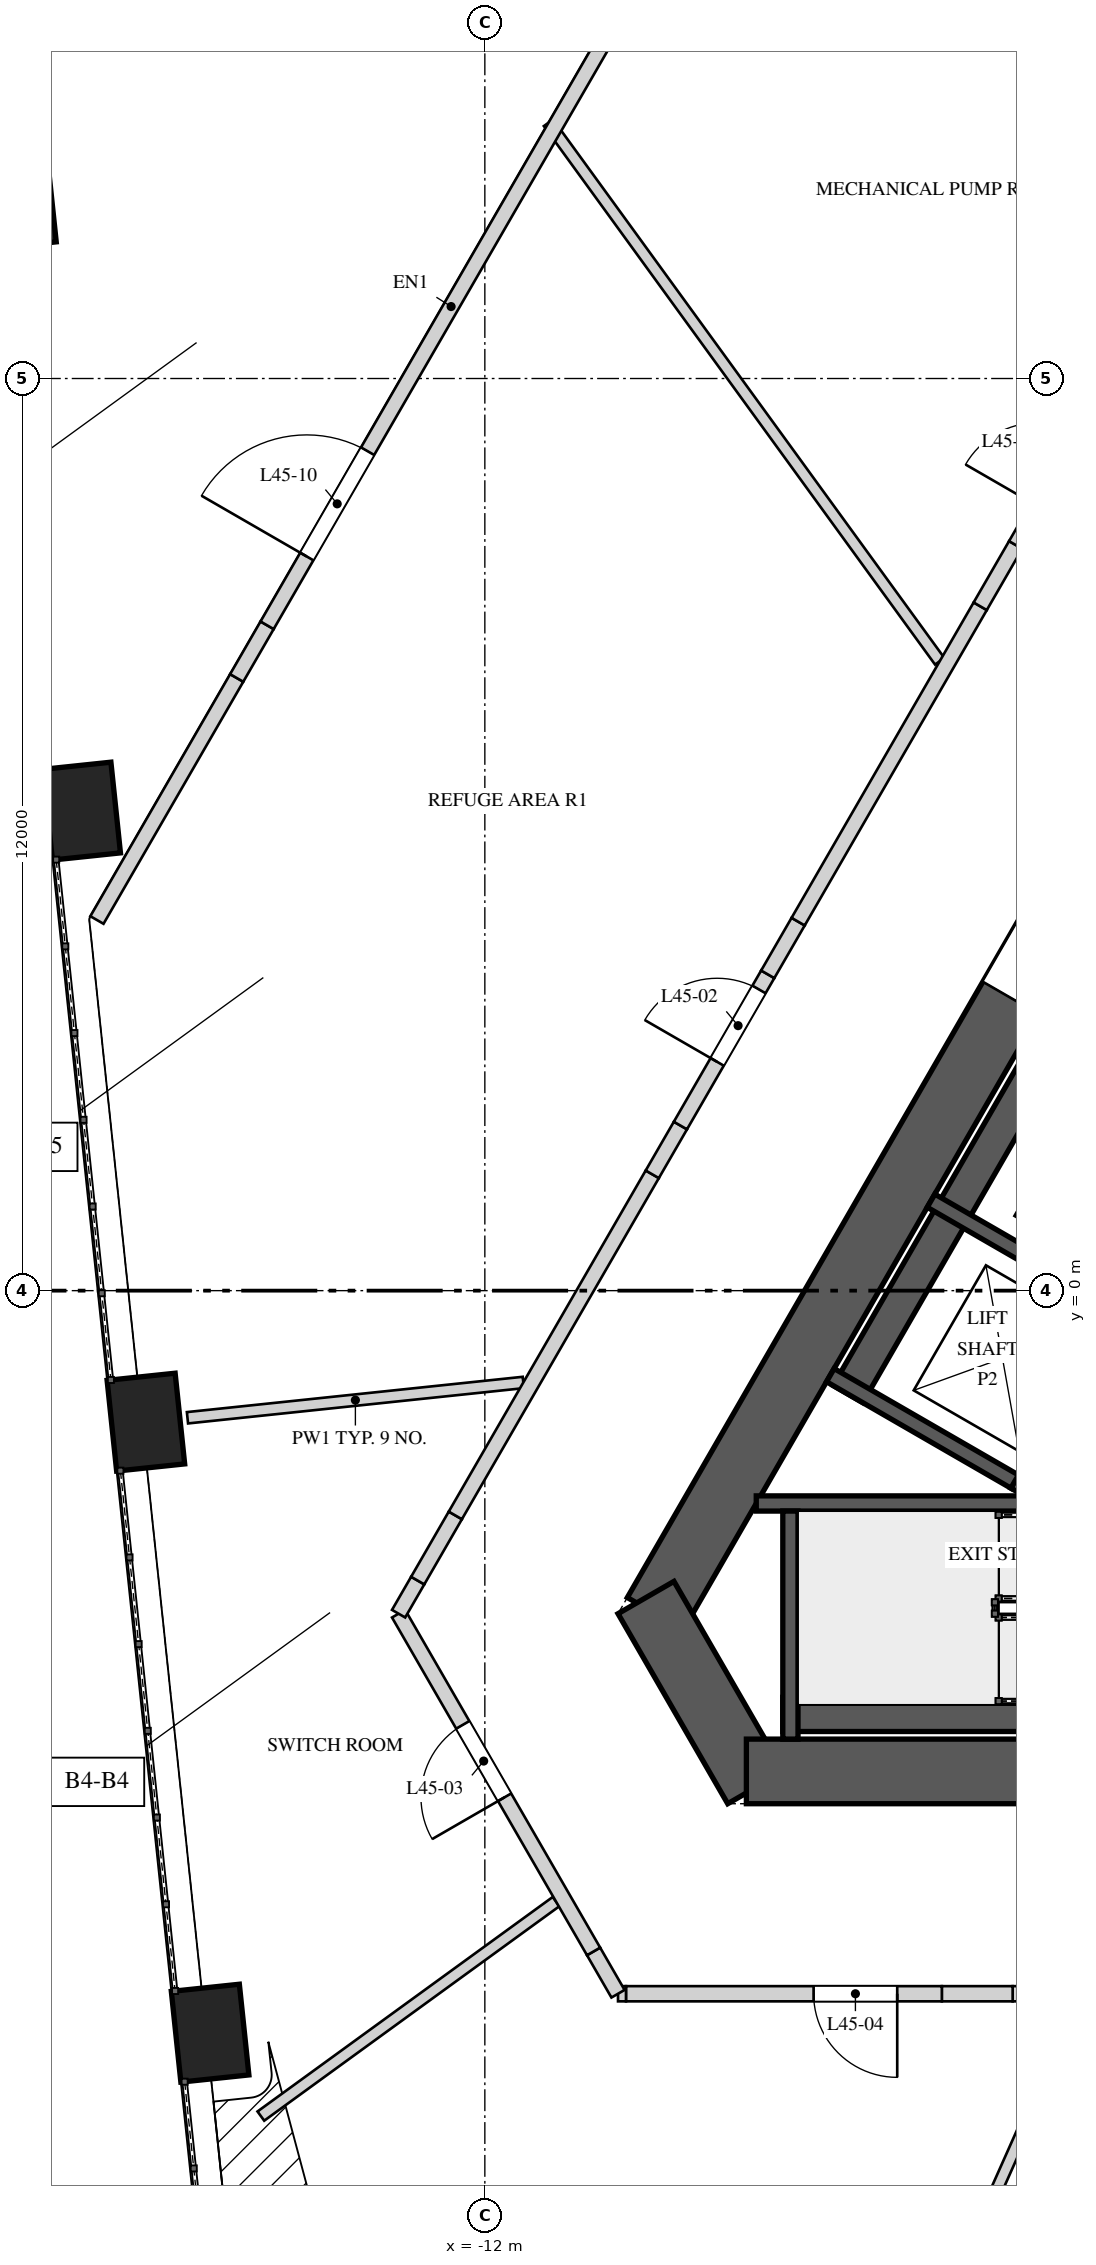
"""IFC4 building model, lengths in metres.
Left out: names, types, materials, properties, quantities, classifications, styles, units other than length and angle.
Written with IfcOpenShell. Run it as: python <this file> out.ifc"""

import sys

from ifc_helpers import new_model, si_unit, direction, frame, frame_2d, origin, origin_2d, place, context, subcontext, project, spatial, rectangle, extrude, element, fill, save


model = new_model("IFC4")
c1 = context("Model", 3, precision=1e-05, world=origin(), true_north=direction((0.0, 1.0)))
c2 = subcontext(c1, "Body", "Model", "MODEL_VIEW")
j1 = project(units=[si_unit("LENGTHUNIT", "METRE"), si_unit("PLANEANGLEUNIT", "RADIAN")], contexts=[c1])
p1 = place(None, origin())
s1 = spatial("IfcSite", under=j1, at=p1, CompositionType="ELEMENT")
p2 = place(p1, origin())
s2 = spatial("IfcBuilding", under=s1, at=p2, CompositionType="ELEMENT")
p3 = place(p2, frame((0.0, 0.0, 194.8)))
s3 = spatial("IfcBuildingStorey", under=s2, at=p3, CompositionType="ELEMENT", Elevation=194.8)
p4 = place(p3, frame((-1.198, 10.575, 0.0), z_axis=(0.0, 0.0, 1.0), x_axis=(-0.499995289315, -0.866028123483, 0.0)))
e1 = element("IfcWall", 1, at=p4, inside=s3, PredefinedType="SHEAR", context=c2, shape_type="SweptSolid", body=[
    extrude(rectangle(XDim=17.118, YDim=0.85, at=frame_2d((8.559, 0.0))), origin(), (0.0, 0.0, 1.0), 5.2),
])
p5 = place(p4, frame((6.764, 0.0, 0.0)))
e2 = element("IfcOpeningElement", 2, at=p5, cuts=e1, PredefinedType="OPENING", context=c2, shape_type="SweptSolid", body=[
    extrude(rectangle(XDim=1.0, YDim=2.4, at=frame_2d((0.5, 1.2))), frame((0.0, 0.435, 0.0), z_axis=(0.0, -1.0, 0.0), x_axis=(1.0, 0.0, 0.0)), (0.0, 0.0, 1.0), 0.87),
])
p6 = place(p3, frame((-9.88, -4.038, 0.0), z_axis=(0.0, 0.0, 1.0), x_axis=(0.499995765644, -0.866027848477, 0.0)))
e3 = element("IfcWall", 3, at=p6, inside=s3, PredefinedType="SHEAR", context=c2, shape_type="SweptSolid", body=[
    extrude(rectangle(XDim=2.887, YDim=0.85, at=frame_2d((1.443, 0.0))), origin(), (0.0, 0.0, 1.0), 5.2),
])
p7 = place(p3, frame((-8.559, -6.325, 0.0), z_axis=(0.0, 0.0, 1.0), x_axis=(1.0, 0.0, 0.0)))
e4 = element("IfcWall", 4, at=p7, inside=s3, PredefinedType="SHEAR", context=c2, shape_type="SweptSolid", body=[
    extrude(rectangle(XDim=17.118, YDim=0.85, at=frame_2d((8.559, 0.0))), origin(), (0.0, 0.0, 1.0), 5.2),
])
p8 = place(p7, frame((6.764, 0.0, 0.0)))
e5 = element("IfcOpeningElement", 5, at=p8, cuts=e4, PredefinedType="OPENING", context=c2, shape_type="SweptSolid", body=[
    extrude(rectangle(XDim=1.0, YDim=2.4, at=frame_2d((0.5, 1.2))), frame((0.0, 0.435, 0.0), z_axis=(0.0, -1.0, 0.0), x_axis=(1.0, 0.0, 0.0)), (0.0, 0.0, 1.0), 0.87),
])
p9 = place(p7, frame((14.742, 0.0, 0.0)))
e6 = element("IfcOpeningElement", 6, at=p9, cuts=e4, PredefinedType="OPENING", context=c2, shape_type="SweptSolid", body=[
    extrude(rectangle(XDim=0.8, YDim=2.1, at=frame_2d((0.4, 1.05))), frame((0.0, 0.435, 0.0), z_axis=(0.0, -1.0, 0.0), x_axis=(1.0, 0.0, 0.0)), (0.0, 0.0, 1.0), 0.87),
])
for number, where, z_axis, x_axis in (
    (7, (-18.149, 14.347, 0.0), (0.0, 0.0, 1.0), (0.105, -0.995, 0.0)),
    (8, (-17.304, 6.309, 0.0), (0.0, 0.0, 1.0), (0.105, -0.995, 0.0)),
    (9, (-16.459, -1.73, 0.0), (0.0, 0.0, 1.0), (0.105, -0.995, 0.0)),
    (10, (-15.615, -9.769, 0.0), (0.0, 0.0, 1.0), (0.105, -0.995, 0.0)),
):
    element("IfcColumn", number, at=place(p3, frame(where, z_axis=z_axis, x_axis=x_axis)), inside=s3, PredefinedType="COLUMN", context=c2, shape_type="SweptSolid", body=[
        extrude(rectangle(XDim=1.2, YDim=0.9, at=origin_2d()), origin(), (0.0, 0.0, 1.0), 2.835),
    ])
p10 = place(p3, frame((-8.08, -5.575, 0.0), z_axis=(0.0, 0.0, 1.0), x_axis=(1.0, 0.0, 0.0)))
e11 = element("IfcWall", 11, at=p10, inside=s3, PredefinedType="SOLIDWALL", context=c2, shape_type="SweptSolid", body=[
    extrude(rectangle(XDim=6.2, YDim=0.45, at=frame_2d((3.1, 0.0))), origin(), (0.0, 0.0, 1.0), 4.85),
])
p11 = place(p3, frame((-8.429, -2.8, 0.0), z_axis=(0.0, 0.0, 1.0), x_axis=(1.0, 0.0, 0.0)))
e12 = element("IfcWall", 12, at=p11, inside=s3, PredefinedType="SOLIDWALL", context=c2, shape_type="SweptSolid", body=[
    extrude(rectangle(XDim=6.549, YDim=0.2, at=frame_2d((3.275, 0.0))), origin(), (0.0, 0.0, 1.0), 4.85),
])
p12 = place(p3, frame((-7.98, -2.9, 0.0), z_axis=(0.0, 0.0, 1.0), x_axis=(0.0, -1.0, 0.0)))
e13 = element("IfcWall", 13, at=p12, inside=s3, PredefinedType="SOLIDWALL", context=c2, shape_type="SweptSolid", body=[
    extrude(rectangle(XDim=3.0, YDim=0.2, at=frame_2d((1.5, 0.0))), origin(), (0.0, 0.0, 1.0), 4.85),
])
p13 = place(p3, frame((-2.243, 2.115, 0.0), z_axis=(0.0, 0.0, 1.0), x_axis=(-0.499996545922, -0.866027397988, 0.0)))
e14 = element("IfcWall", 14, at=p13, inside=s3, PredefinedType="SOLIDWALL", context=c2, shape_type="SweptSolid", body=[
    extrude(rectangle(XDim=5.5, YDim=0.2, at=frame_2d((2.75, 0.0))), origin(), (0.0, 0.0, 1.0), 4.85),
])
p14 = place(p13, frame((1.22, 0.0, 0.0)))
e15 = element("IfcOpeningElement", 15, at=p14, cuts=e14, PredefinedType="OPENING", context=c2, shape_type="SweptSolid", body=[
    extrude(rectangle(XDim=1.1, YDim=2.1, at=frame_2d((0.55, 1.05))), frame((0.0, 0.11, 0.0), z_axis=(0.0, -1.0, 0.0), x_axis=(1.0, 0.0, 0.0)), (0.0, 0.0, 1.0), 0.22),
])
p15 = place(p13, frame((3.525, 0.0, 0.0)))
e16 = element("IfcOpeningElement", 16, at=p15, cuts=e14, PredefinedType="OPENING", context=c2, shape_type="SweptSolid", body=[
    extrude(rectangle(XDim=1.1, YDim=2.1, at=frame_2d((0.55, 1.05))), frame((0.0, 0.11, 0.0), z_axis=(0.0, -1.0, 0.0), x_axis=(1.0, 0.0, 0.0)), (0.0, 0.0, 1.0), 0.22),
])
p16 = place(p3, frame((-4.473, 3.402, 0.0), z_axis=(0.0, 0.0, 1.0), x_axis=(-0.499996545922, -0.866027397988, 0.0)))
e17 = element("IfcWall", 17, at=p16, inside=s3, PredefinedType="SOLIDWALL", context=c2, shape_type="SweptSolid", body=[
    extrude(rectangle(XDim=5.5, YDim=0.45, at=frame_2d((2.75, 0.0))), origin(), (0.0, 0.0, 1.0), 4.85),
])
p17 = place(p3, frame((-3.705, -0.217, 0.0), z_axis=(0.0, 0.0, 1.0), x_axis=(-0.866018616679, 0.500011755427, 0.0)))
e18 = element("IfcWall", 18, at=p17, inside=s3, PredefinedType="SOLIDWALL", context=c2, shape_type="SweptSolid", body=[
    extrude(rectangle(XDim=2.8, YDim=0.2, at=frame_2d((1.4, 0.0))), origin(), (0.0, 0.0, 1.0), 4.85),
])
p18 = place(p3, frame((-5.03, -2.512, 0.0), z_axis=(0.0, 0.0, 1.0), x_axis=(-0.865996816683, 0.500049511043, 0.0)))
e19 = element("IfcWall", 19, at=p18, inside=s3, PredefinedType="SOLIDWALL", context=c2, shape_type="SweptSolid", body=[
    extrude(rectangle(XDim=2.8, YDim=0.2, at=frame_2d((1.4, 0.0))), origin(), (0.0, 0.0, 1.0), 4.85),
])
p19 = place(p3, frame((-11.494, -1.208, 0.0), z_axis=(0.0, 0.0, 1.0), x_axis=(-0.994522903308, -0.104518872919, 0.0)))
e20 = element("IfcWall", 20, at=p19, inside=s3, PredefinedType="PARTITIONING", context=c2, shape_type="SweptSolid", body=[
    extrude(rectangle(XDim=4.443, YDim=0.15, at=frame_2d((2.221, 0.0))), origin(), (0.0, 0.0, 1.0), 4.85),
])
p20 = place(p3, frame((-11.063, -8.038, 0.0), z_axis=(0.0, 0.0, 1.0), x_axis=(-0.809019702923, -0.587781524278, 0.0)))
e21 = element("IfcWall", 21, at=p20, inside=s3, PredefinedType="PARTITIONING", context=c2, shape_type="SweptSolid", body=[
    extrude(rectangle(XDim=4.8, YDim=0.15, at=frame_2d((2.4, 0.0))), origin(), (0.0, 0.0, 1.0), 4.85),
])
p21 = place(p3, frame((-6.016, 8.28, 0.0), z_axis=(0.0, 0.0, 1.0), x_axis=(-0.587788699653, 0.809014489709, 0.0)))
e22 = element("IfcWall", 22, at=p21, inside=s3, PredefinedType="PARTITIONING", context=c2, shape_type="SweptSolid", body=[
    extrude(rectangle(XDim=8.757, YDim=0.15, at=frame_2d((4.378, 0.0))), origin(), (0.0, 0.0, 1.0), 4.85),
])
p22 = place(p3, frame((-4.163, -9.35, 0.0), z_axis=(0.0, 0.0, 1.0), x_axis=(-0.406730743463, -0.913548084297, 0.0)))
e23 = element("IfcWall", 23, at=p22, inside=s3, PredefinedType="PARTITIONING", context=c2, shape_type="SweptSolid", body=[
    extrude(rectangle(XDim=8.757, YDim=0.15, at=frame_2d((4.378, 0.0))), origin(), (0.0, 0.0, 1.0), 4.85),
])
p23 = place(p3, frame((-0.265, -9.25, 0.0), z_axis=(0.0, 0.0, 1.0), x_axis=(-1.0, 0.0, 0.0)))
e24 = element("IfcWall", 24, at=p23, inside=s3, PredefinedType="SOLIDWALL", context=c2, shape_type="SweptSolid", body=[
    extrude(rectangle(XDim=4.791, YDim=0.2, at=frame_2d((2.396, 0.0))), origin(), (0.0, 0.0, 1.0), 4.85),
])
p24 = place(p3, frame((-5.056, -9.25, 0.0), z_axis=(0.0, 0.0, 1.0), x_axis=(-1.0, 0.0, 0.0)))
e25 = element("IfcWall", 25, at=p24, inside=s3, PredefinedType="SOLIDWALL", context=c2, shape_type="SweptSolid", body=[
    extrude(rectangle(XDim=0.932, YDim=0.2, at=frame_2d((0.466, 0.0))), origin(), (0.0, 0.0, 1.0), 3.95),
])
p25 = place(p3, frame((-5.988, -9.25, 0.0), z_axis=(0.0, 0.0, 1.0), x_axis=(-1.0, 0.0, 0.0)))
e26 = element("IfcWall", 26, at=p25, inside=s3, PredefinedType="SOLIDWALL", context=c2, shape_type="SweptSolid", body=[
    extrude(rectangle(XDim=4.155, YDim=0.2, at=frame_2d((2.078, 0.0))), origin(), (0.0, 0.0, 1.0), 4.85),
])
p26 = place(p25, frame((0.587, 0.0, 0.0)))
e27 = element("IfcOpeningElement", 27, at=p26, cuts=e26, PredefinedType="OPENING", context=c2, shape_type="SweptSolid", body=[
    extrude(rectangle(XDim=1.1, YDim=2.2, at=frame_2d((0.55, 1.1))), frame((0.0, 0.11, 0.0), z_axis=(0.0, -1.0, 0.0), x_axis=(1.0, 0.0, 0.0)), (0.0, 0.0, 1.0), 0.22),
])
p27 = place(p3, frame((-10.143, -9.25, 0.0), z_axis=(0.0, 0.0, 1.0), x_axis=(-1.0, 0.0, 0.0)))
e28 = element("IfcWall", 28, at=p27, inside=s3, PredefinedType="SOLIDWALL", context=c2, shape_type="SweptSolid", body=[
    extrude(rectangle(XDim=0.105, YDim=0.2, at=frame_2d((0.052, 0.0))), origin(), (0.0, 0.0, 1.0), 4.15),
])
p28 = place(p3, frame((-10.248, -9.25, 0.0), z_axis=(0.0, 0.0, 1.0), x_axis=(-0.499733411443, 0.86617926406, 0.0)))
e29 = element("IfcWall", 29, at=p28, inside=s3, PredefinedType="SOLIDWALL", context=c2, shape_type="SweptSolid", body=[
    extrude(rectangle(XDim=0.643, YDim=0.2, at=frame_2d((0.321, 0.0))), origin(), (0.0, 0.0, 1.0), 4.15),
])
p29 = place(p3, frame((-10.569, -8.693, 0.0), z_axis=(0.0, 0.0, 1.0), x_axis=(-0.500028638513, 0.8660088687, 0.0)))
e30 = element("IfcWall", 30, at=p29, inside=s3, PredefinedType="SOLIDWALL", context=c2, shape_type="SweptSolid", body=[
    extrude(rectangle(XDim=5.131, YDim=0.2, at=frame_2d((2.565, 0.0))), origin(), (0.0, 0.0, 1.0), 4.85),
])
p30 = place(p29, frame((2.342, 0.0, 0.0)))
e31 = element("IfcOpeningElement", 31, at=p30, cuts=e30, PredefinedType="OPENING", context=c2, shape_type="SweptSolid", body=[
    extrude(rectangle(XDim=1.1, YDim=2.2, at=frame_2d((0.55, 1.1))), frame((0.0, 0.11, 0.0), z_axis=(0.0, -1.0, 0.0), x_axis=(1.0, 0.0, 0.0)), (0.0, 0.0, 1.0), 0.22),
])
p31 = place(p3, frame((-13.135, -4.25, 0.0), z_axis=(0.0, 0.0, 1.0), x_axis=(0.500002592159, 0.866023907196, 0.0)))
e32 = element("IfcWall", 32, at=p31, inside=s3, PredefinedType="SOLIDWALL", context=c2, shape_type="SweptSolid", body=[
    extrude(rectangle(XDim=0.503, YDim=0.2, at=frame_2d((0.251, 0.0))), origin(), (0.0, 0.0, 1.0), 4.85),
])
p32 = place(p3, frame((-12.883, -3.814, 0.0), z_axis=(0.0, 0.0, 1.0), x_axis=(0.500063959222, 0.865988473761, 0.0)))
e33 = element("IfcWall", 33, at=p32, inside=s3, PredefinedType="SOLIDWALL", context=c2, shape_type="SweptSolid", body=[
    extrude(rectangle(XDim=0.99, YDim=0.2, at=frame_2d((0.495, 0.0))), origin(), (0.0, 0.0, 1.0), 4.15),
])
p33 = place(p3, frame((-12.388, -2.957, 0.0), z_axis=(0.0, 0.0, 1.0), x_axis=(0.499990271856, 0.866031020258, 0.0)))
e34 = element("IfcWall", 34, at=p33, inside=s3, PredefinedType="SOLIDWALL", context=c2, shape_type="SweptSolid", body=[
    extrude(rectangle(XDim=5.182, YDim=0.2, at=frame_2d((2.591, 0.0))), origin(), (0.0, 0.0, 1.0), 4.85),
])
p34 = place(p3, frame((-9.797, 1.531, 0.0), z_axis=(0.0, 0.0, 1.0), x_axis=(0.499931655587, 0.866064858854, 0.0)))
e35 = element("IfcWall", 35, at=p34, inside=s3, PredefinedType="SOLIDWALL", context=c2, shape_type="SweptSolid", body=[
    extrude(rectangle(XDim=0.741, YDim=0.2, at=frame_2d((0.37, 0.0))), origin(), (0.0, 0.0, 1.0), 4.15),
])
p35 = place(p3, frame((-9.427, 2.172, 0.0), z_axis=(0.0, 0.0, 1.0), x_axis=(0.500013761451, 0.866017458461, 0.0)))
e36 = element("IfcWall", 36, at=p35, inside=s3, PredefinedType="SOLIDWALL", context=c2, shape_type="SweptSolid", body=[
    extrude(rectangle(XDim=2.297, YDim=0.2, at=frame_2d((1.149, 0.0))), origin(), (0.0, 0.0, 1.0), 4.85),
])
p36 = place(p35, frame((0.967, 0.0, 0.0)))
e37 = element("IfcOpeningElement", 37, at=p36, cuts=e36, PredefinedType="OPENING", context=c2, shape_type="SweptSolid", body=[
    extrude(rectangle(XDim=1.1, YDim=2.2, at=frame_2d((0.55, 1.1))), frame((0.0, 0.11, 0.0), z_axis=(0.0, -1.0, 0.0), x_axis=(1.0, 0.0, 0.0)), (0.0, 0.0, 1.0), 0.22),
])
p37 = place(p3, frame((-8.278, 4.162, 0.0), z_axis=(0.0, 0.0, 1.0), x_axis=(0.500109828528, 0.865961984968, 0.0)))
e38 = element("IfcWall", 38, at=p37, inside=s3, PredefinedType="SOLIDWALL", context=c2, shape_type="SweptSolid", body=[
    extrude(rectangle(XDim=0.8, YDim=0.2, at=frame_2d((0.4, 0.0))), origin(), (0.0, 0.0, 1.0), 3.95),
])
p38 = place(p3, frame((-7.878, 4.854, 0.0), z_axis=(0.0, 0.0, 1.0), x_axis=(0.499997407846, 0.86602690036, 0.0)))
e39 = element("IfcWall", 39, at=p38, inside=s3, PredefinedType="SOLIDWALL", context=c2, shape_type="SweptSolid", body=[
    extrude(rectangle(XDim=4.791, YDim=0.2, at=frame_2d((2.396, 0.0))), origin(), (0.0, 0.0, 1.0), 4.85),
])
p39 = place(p3, frame((-5.483, 9.004, 0.0), z_axis=(0.0, 0.0, 1.0), x_axis=(0.499971966783, 0.866041588165, 0.0)))
e40 = element("IfcWall", 40, at=p39, inside=s3, PredefinedType="SOLIDWALL", context=c2, shape_type="SweptSolid", body=[
    extrude(rectangle(XDim=0.932, YDim=0.2, at=frame_2d((0.466, 0.0))), origin(), (0.0, 0.0, 1.0), 3.95),
])
p40 = place(p3, frame((-5.017, 9.811, 0.0), z_axis=(0.0, 0.0, 1.0), x_axis=(0.499993700073, 0.866029041019, 0.0)))
e41 = element("IfcWall", 41, at=p40, inside=s3, PredefinedType="SOLIDWALL", context=c2, shape_type="SweptSolid", body=[
    extrude(rectangle(XDim=4.155, YDim=0.2, at=frame_2d((2.078, 0.0))), origin(), (0.0, 0.0, 1.0), 4.85),
])
p41 = place(p40, frame((0.587, 0.0, 0.0)))
e42 = element("IfcOpeningElement", 42, at=p41, cuts=e41, PredefinedType="OPENING", context=c2, shape_type="SweptSolid", body=[
    extrude(rectangle(XDim=1.1, YDim=2.2, at=frame_2d((0.55, 1.1))), frame((0.0, 0.11, 0.0), z_axis=(0.0, -1.0, 0.0), x_axis=(1.0, 0.0, 0.0)), (0.0, 0.0, 1.0), 0.22),
])
p42 = place(p3, frame((-17.103, 4.876, 0.0), z_axis=(0.0, 0.0, 1.0), x_axis=(0.499952348839, 0.866052913447, 0.0)))
e43 = element("IfcWall", 43, at=p42, inside=s3, PredefinedType="SOLIDWALL", context=c2, shape_type="SweptSolid", body=[
    extrude(rectangle(XDim=3.677, YDim=0.2, at=frame_2d((1.838, 0.0))), origin(), (0.0, 0.0, 1.0), 4.85),
])
p43 = place(p3, frame((-15.265, 8.061, 0.0), z_axis=(0.0, 0.0, 1.0), x_axis=(0.500109828528, 0.865961984968, 0.0)))
e44 = element("IfcWall", 44, at=p43, inside=s3, PredefinedType="SOLIDWALL", context=c2, shape_type="SweptSolid", body=[
    extrude(rectangle(XDim=0.8, YDim=0.2, at=frame_2d((0.4, 0.0))), origin(), (0.0, 0.0, 1.0), 3.95),
])
p44 = place(p3, frame((-14.865, 8.753, 0.0), z_axis=(0.0, 0.0, 1.0), x_axis=(0.50000034515, 0.866025204512, 0.0)))
e45 = element("IfcWall", 45, at=p44, inside=s3, PredefinedType="SOLIDWALL", context=c2, shape_type="SweptSolid", body=[
    extrude(rectangle(XDim=9.684, YDim=0.2, at=frame_2d((4.842, 0.0))), origin(), (0.0, 0.0, 1.0), 4.85),
])
p45 = place(p44, frame((1.045, 0.0, 0.0)))
e46 = element("IfcOpeningElement", 46, at=p45, cuts=e45, PredefinedType="OPENING", context=c2, shape_type="SweptSolid", body=[
    extrude(rectangle(XDim=1.6, YDim=2.3, at=frame_2d((0.8, 1.15))), frame((0.0, 0.11, 0.0), z_axis=(0.0, -1.0, 0.0), x_axis=(1.0, 0.0, 0.0)), (0.0, 0.0, 1.0), 0.22),
])
p46 = place(p5, origin())
e47 = element("IfcDoor", 47, at=p46, inside=s3, OperationType="SINGLE_SWING_RIGHT", PredefinedType="DOOR", context=c2, shape_type="SweptSolid", body=[
    extrude(rectangle(XDim=1.0, YDim=2.4, at=frame_2d((0.5, 1.2))), frame((0.0, 0.025, 0.0), z_axis=(0.0, -1.0, 0.0), x_axis=(1.0, 0.0, 0.0)), (0.0, 0.0, 1.0), 0.05),
])
fill(e2, e47)
p47 = place(p36, origin())
e48 = element("IfcDoor", 48, at=p47, inside=s3, OperationType="SINGLE_SWING_RIGHT", PredefinedType="DOOR", context=c2, shape_type="SweptSolid", body=[
    extrude(rectangle(XDim=1.1, YDim=2.2, at=frame_2d((0.55, 1.1))), frame((0.0, 0.025, 0.0), z_axis=(0.0, -1.0, 0.0), x_axis=(1.0, 0.0, 0.0)), (0.0, 0.0, 1.0), 0.05),
])
fill(e37, e48)
p48 = place(p30, origin())
e49 = element("IfcDoor", 49, at=p48, inside=s3, OperationType="SINGLE_SWING_LEFT", PredefinedType="DOOR", context=c2, shape_type="SweptSolid", body=[
    extrude(rectangle(XDim=1.1, YDim=2.2, at=frame_2d((0.55, 1.1))), frame((0.0, 0.025, 0.0), z_axis=(0.0, -1.0, 0.0), x_axis=(1.0, 0.0, 0.0)), (0.0, 0.0, 1.0), 0.05),
])
fill(e31, e49)
p49 = place(p26, origin())
e50 = element("IfcDoor", 50, at=p49, inside=s3, OperationType="SINGLE_SWING_RIGHT", PredefinedType="DOOR", context=c2, shape_type="SweptSolid", body=[
    extrude(rectangle(XDim=1.1, YDim=2.2, at=frame_2d((0.55, 1.1))), frame((0.0, 0.025, 0.0), z_axis=(0.0, -1.0, 0.0), x_axis=(1.0, 0.0, 0.0)), (0.0, 0.0, 1.0), 0.05),
])
fill(e27, e50)
p50 = place(p45, origin())
e51 = element("IfcDoor", 51, at=p50, inside=s3, OperationType="DOUBLE_DOOR_SINGLE_SWING", PredefinedType="DOOR", context=c2, shape_type="SweptSolid", body=[
    extrude(rectangle(XDim=1.6, YDim=2.3, at=frame_2d((0.8, 1.15))), frame((0.0, 0.025, 0.0), z_axis=(0.0, -1.0, 0.0), x_axis=(1.0, 0.0, 0.0)), (0.0, 0.0, 1.0), 0.05),
])
fill(e46, e51)
save(model, sys.argv[1])
